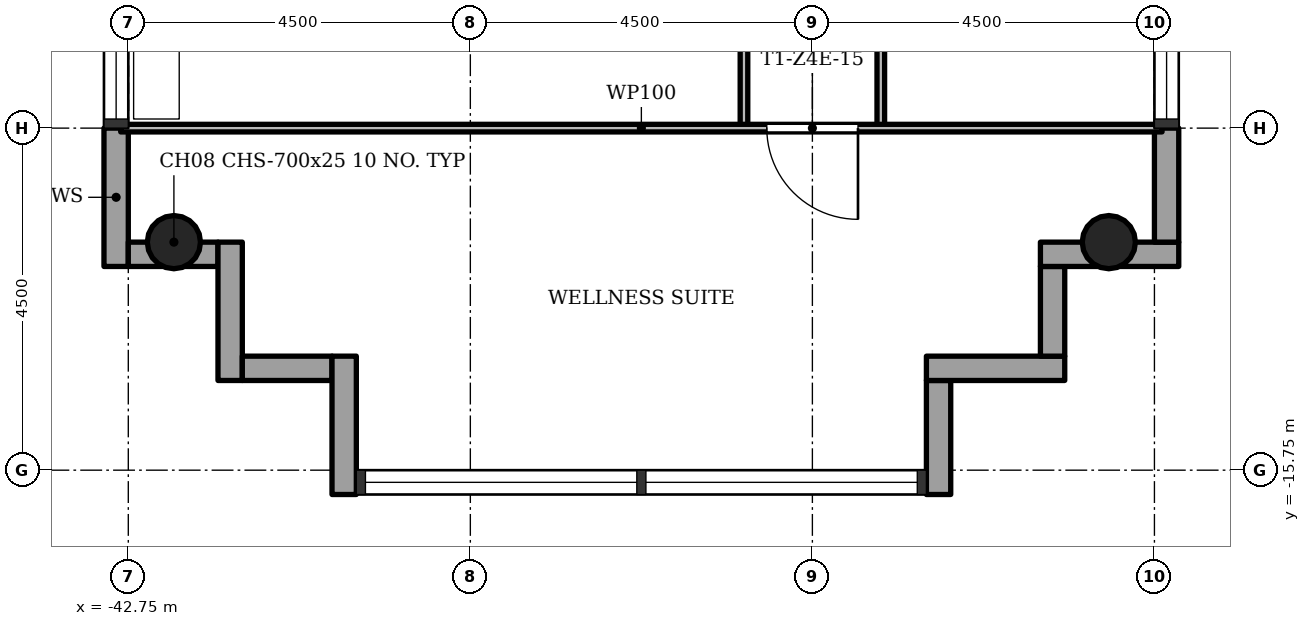
"""IFC4 building model, lengths in metres.
Left out: names, types, materials, properties, quantities, classifications, styles, units other than length and angle.
Written with IfcOpenShell. Run it as: python <this file> out.ifc"""

import sys

from ifc_helpers import new_model, si_unit, direction, frame, frame_2d, origin, origin_2d, place, context, subcontext, project, spatial, rectangle, hollow_circle, extrude, element, fill, save


model = new_model("IFC4")
c1 = context("Model", 3, precision=1e-05, world=origin(), true_north=direction((0.0, 1.0)))
c2 = subcontext(c1, "Body", "Model", "MODEL_VIEW")
j1 = project(units=[si_unit("LENGTHUNIT", "METRE"), si_unit("PLANEANGLEUNIT", "RADIAN")], contexts=[c1])
p1 = place(None, origin())
s1 = spatial("IfcSite", under=j1, at=p1, CompositionType="ELEMENT")
p2 = place(p1, origin())
s2 = spatial("IfcBuilding", under=s1, at=p2, CompositionType="ELEMENT")
p3 = place(p2, frame((0.0, 0.0, 213.0)))
s3 = spatial("IfcBuildingStorey", under=s2, at=p3, CompositionType="ELEMENT", Elevation=213.0)
for number, where, z_axis, x_axis in (
    (1, (-42.15, -12.75, 0.0), (0.0, 0.0, 1.0), (1.0, 0.0, 0.0)),
    (2, (-29.85, -12.75, 0.0), (0.0, 0.0, 1.0), (1.0, 0.0, 0.0)),
):
    element("IfcColumn", number, at=place(p3, frame(where, z_axis=z_axis, x_axis=x_axis)), inside=s3, PredefinedType="COLUMN", context=c2, shape_type="SweptSolid", body=[
        extrude(hollow_circle(Radius=0.35, WallThickness=0.025, at=origin_2d()), origin(), (0.0, 0.0, 1.0), 3.4),
    ])
p4 = place(p3, frame((-42.91, -11.25, -0.3), z_axis=(0.0, 0.0, 1.0), x_axis=(0.0, -1.0, 0.0)))
e3 = element("IfcWall", 3, at=p4, inside=s3, PredefinedType="STANDARD", context=c2, shape_type="SweptSolid", body=[
    extrude(rectangle(XDim=1.82, YDim=0.32, at=frame_2d((0.91, 0.0))), origin(), (0.0, 0.0, 1.0), 3.4),
])
p5 = place(p3, frame((-42.75, -12.91, -0.3), z_axis=(0.0, 0.0, 1.0), x_axis=(1.0, 0.0, 0.0)))
e4 = element("IfcWall", 4, at=p5, inside=s3, PredefinedType="STANDARD", context=c2, shape_type="SweptSolid", body=[
    extrude(rectangle(XDim=1.18, YDim=0.32, at=frame_2d((0.59, 0.0))), origin(), (0.0, 0.0, 1.0), 3.4),
])
p6 = place(p3, frame((-41.41, -12.75, -0.3), z_axis=(0.0, 0.0, 1.0), x_axis=(0.0, -1.0, 0.0)))
e5 = element("IfcWall", 5, at=p6, inside=s3, PredefinedType="STANDARD", context=c2, shape_type="SweptSolid", body=[
    extrude(rectangle(XDim=1.82, YDim=0.32, at=frame_2d((0.91, 0.0))), origin(), (0.0, 0.0, 1.0), 3.4),
])
p7 = place(p3, frame((-41.25, -14.41, -0.3), z_axis=(0.0, 0.0, 1.0), x_axis=(1.0, 0.0, 0.0)))
e6 = element("IfcWall", 6, at=p7, inside=s3, PredefinedType="STANDARD", context=c2, shape_type="SweptSolid", body=[
    extrude(rectangle(XDim=1.18, YDim=0.32, at=frame_2d((0.59, 0.0))), origin(), (0.0, 0.0, 1.0), 3.4),
])
p8 = place(p3, frame((-39.91, -14.25, -0.3), z_axis=(0.0, 0.0, 1.0), x_axis=(0.0, -1.0, 0.0)))
e7 = element("IfcWall", 7, at=p8, inside=s3, PredefinedType="STANDARD", context=c2, shape_type="SweptSolid", body=[
    extrude(rectangle(XDim=1.82, YDim=0.32, at=frame_2d((0.91, 0.0))), origin(), (0.0, 0.0, 1.0), 3.4),
])
p9 = place(p3, frame((-32.09, -16.07, -0.3), z_axis=(0.0, 0.0, 1.0), x_axis=(0.0, 1.0, 0.0)))
e8 = element("IfcWall", 8, at=p9, inside=s3, PredefinedType="STANDARD", context=c2, shape_type="SweptSolid", body=[
    extrude(rectangle(XDim=1.5, YDim=0.32, at=frame_2d((0.75, 0.0))), origin(), (0.0, 0.0, 1.0), 3.4),
])
p10 = place(p3, frame((-32.25, -14.41, -0.3), z_axis=(0.0, 0.0, 1.0), x_axis=(1.0, 0.0, 0.0)))
e9 = element("IfcWall", 9, at=p10, inside=s3, PredefinedType="STANDARD", context=c2, shape_type="SweptSolid", body=[
    extrude(rectangle(XDim=1.82, YDim=0.32, at=frame_2d((0.91, 0.0))), origin(), (0.0, 0.0, 1.0), 3.4),
])
p11 = place(p3, frame((-30.59, -14.25, -0.3), z_axis=(0.0, 0.0, 1.0), x_axis=(0.0, 1.0, 0.0)))
e10 = element("IfcWall", 10, at=p11, inside=s3, PredefinedType="STANDARD", context=c2, shape_type="SweptSolid", body=[
    extrude(rectangle(XDim=1.18, YDim=0.32, at=frame_2d((0.59, 0.0))), origin(), (0.0, 0.0, 1.0), 3.4),
])
p12 = place(p3, frame((-30.75, -12.91, -0.3), z_axis=(0.0, 0.0, 1.0), x_axis=(1.0, 0.0, 0.0)))
e11 = element("IfcWall", 11, at=p12, inside=s3, PredefinedType="STANDARD", context=c2, shape_type="SweptSolid", body=[
    extrude(rectangle(XDim=1.82, YDim=0.32, at=frame_2d((0.91, 0.0))), origin(), (0.0, 0.0, 1.0), 3.4),
])
p13 = place(p3, frame((-29.09, -12.75, -0.3), z_axis=(0.0, 0.0, 1.0), x_axis=(0.0, 1.0, 0.0)))
e12 = element("IfcWall", 12, at=p13, inside=s3, PredefinedType="STANDARD", context=c2, shape_type="SweptSolid", body=[
    extrude(rectangle(XDim=1.5, YDim=0.32, at=frame_2d((0.75, 0.0))), origin(), (0.0, 0.0, 1.0), 3.4),
])
p14 = place(p3, frame((-34.65, -11.25, 0.0), z_axis=(0.0, 0.0, 1.0), x_axis=(0.0, 1.0, 0.0)))
e13 = element("IfcWall", 13, at=p14, inside=s3, PredefinedType="PARTITIONING", context=c2, shape_type="SweptSolid", body=[
    extrude(rectangle(XDim=2.7, YDim=0.1, at=frame_2d((1.35, 0.0))), origin(), (0.0, 0.0, 1.0), 3.0),
])
p15 = place(p14, frame((1.73, 0.0, 0.0)))
e14 = element("IfcOpeningElement", 14, at=p15, cuts=e13, PredefinedType="OPENING", context=c2, shape_type="SweptSolid", body=[
    extrude(rectangle(XDim=0.9, YDim=2.1, at=frame_2d((0.45, 1.05))), frame((0.0, 0.06, 0.0), z_axis=(0.0, -1.0, 0.0), x_axis=(1.0, 0.0, 0.0)), (0.0, 0.0, 1.0), 0.12),
])
p16 = place(p3, frame((-32.85, -11.25, 0.0), z_axis=(0.0, 0.0, 1.0), x_axis=(0.0, 1.0, 0.0)))
e15 = element("IfcWall", 15, at=p16, inside=s3, PredefinedType="PARTITIONING", context=c2, shape_type="SweptSolid", body=[
    extrude(rectangle(XDim=4.5, YDim=0.1, at=frame_2d((2.25, 0.0))), origin(), (0.0, 0.0, 1.0), 3.0),
])
p17 = place(p16, frame((1.8, 0.0, 0.0)))
e16 = element("IfcOpeningElement", 16, at=p17, cuts=e15, PredefinedType="OPENING", context=c2, shape_type="SweptSolid", body=[
    extrude(rectangle(XDim=0.9, YDim=2.1, at=frame_2d((0.45, 1.05))), frame((0.0, 0.06, 0.0), z_axis=(0.0, -1.0, 0.0), x_axis=(1.0, 0.0, 0.0)), (0.0, 0.0, 1.0), 0.12),
])
p18 = place(p3, frame((-42.85, -11.25, 0.0), z_axis=(0.0, 0.0, 1.0), x_axis=(1.0, 0.0, 0.0)))
e17 = element("IfcWall", 17, at=p18, inside=s3, PredefinedType="PARTITIONING", context=c2, shape_type="SweptSolid", body=[
    extrude(rectangle(XDim=13.7, YDim=0.1, at=frame_2d((6.85, 0.0))), origin(), (0.0, 0.0, 1.0), 3.0),
])
p19 = place(p18, frame((8.5, 0.0, 0.0)))
e18 = element("IfcOpeningElement", 18, at=p19, cuts=e17, PredefinedType="OPENING", context=c2, shape_type="SweptSolid", body=[
    extrude(rectangle(XDim=1.2, YDim=2.1, at=frame_2d((0.6, 1.05))), frame((0.0, 0.06, 0.0), z_axis=(0.0, -1.0, 0.0), x_axis=(1.0, 0.0, 0.0)), (0.0, 0.0, 1.0), 0.12),
])
p20 = place(p19, origin())
e19 = element("IfcDoor", 19, at=p20, inside=s3, OperationType="SINGLE_SWING_RIGHT", PredefinedType="DOOR", context=c2, shape_type="SweptSolid", body=[
    extrude(rectangle(XDim=1.2, YDim=2.1, at=frame_2d((0.6, 1.05))), frame((0.0, 0.025, 0.0), z_axis=(0.0, -1.0, 0.0), x_axis=(1.0, 0.0, 0.0)), (0.0, 0.0, 1.0), 0.05),
])
fill(e18, e19)
save(model, sys.argv[1])
